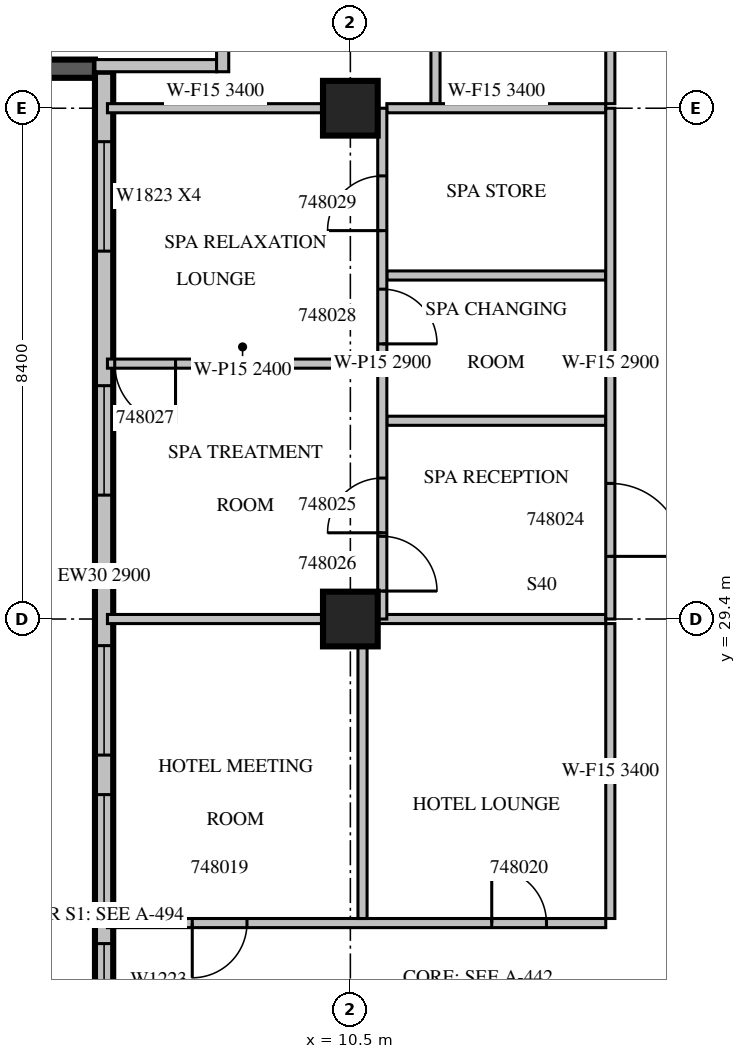
"""IFC4 building model, lengths in metres.
Left out: names, types, materials, properties, quantities, classifications, styles, units other than length and angle.
Written with IfcOpenShell. Run it as: python <this file> out.ifc"""

import sys

from ifc_helpers import new_model, si_unit, direction, frame, frame_2d, origin, origin_2d, place, context, subcontext, project, spatial, rectangle, extrude, source, transform, mapped, element, fill, save


model = new_model("IFC4")
c1 = context("Model", 3, precision=1e-05, world=origin(), true_north=direction((0.0, 1.0)))
c2 = subcontext(c1, "Body", "Model", "MODEL_VIEW")
j1 = project(units=[si_unit("LENGTHUNIT", "METRE"), si_unit("PLANEANGLEUNIT", "RADIAN")], contexts=[c1])
p1 = place(None, origin())
s1 = spatial("IfcSite", under=j1, at=p1, CompositionType="ELEMENT")
p2 = place(p1, origin())
s2 = spatial("IfcBuilding", under=s1, at=p2, CompositionType="ELEMENT")
p3 = place(p2, frame((0.0, 0.0, 215.8)))
s3 = spatial("IfcBuildingStorey", under=s2, at=p3, CompositionType="ELEMENT", Elevation=215.8)
m1 = source(origin(), c2, "Body", "SweptSolid", [
    extrude(rectangle(XDim=0.9, YDim=0.9, at=origin_2d()), origin(), (0.0, 0.0, 1.0), 3.8),
])
for number, where, z_axis, x_axis in (
    (1, (10.5, 29.4, 0.0), (0.0, 0.0, 1.0), (1.0, 0.0, 0.0)),
    (2, (10.5, 37.8, 0.0), (0.0, 0.0, 1.0), (1.0, 0.0, 0.0)),
):
    element("IfcColumn", number, at=place(p3, frame(where, z_axis=z_axis, x_axis=x_axis)), inside=s3, PredefinedType="COLUMN", context=c2, shape_type="MappedRepresentation", body=[
        mapped(m1, transform((0.0, 0.0, 0.0), scale=1.0)),
    ])
m2 = source(origin(), c2, "Body", "SweptSolid", [
    extrude(rectangle(XDim=6.1, YDim=0.3, at=frame_2d((3.05, 0.0))), origin(), (0.0, 0.0, 1.0), 3.4),
])
p4 = place(p3, frame((0.2, 38.45, 0.0), z_axis=(0.0, 0.0, 1.0), x_axis=(1.0, 0.0, 0.0)))
e3 = element("IfcWall", 3, at=p4, inside=s3, PredefinedType="SOLIDWALL", context=c2, shape_type="MappedRepresentation", body=[
    mapped(m2, transform((0.0, 0.0, 0.0), scale=1.0)),
])
m3 = source(origin(), c2, "Body", "SweptSolid", [
    extrude(rectangle(XDim=16.6, YDim=0.3, at=frame_2d((8.3, 0.0))), origin(), (0.0, 0.0, 1.0), 2.9),
])
p5 = place(p3, frame((6.45, 38.4, 0.0), z_axis=(0.0, 0.0, 1.0), x_axis=(0.0, -1.0, 0.0)))
e4 = element("IfcWall", 4, at=p5, inside=s3, PredefinedType="STANDARD", context=c2, shape_type="MappedRepresentation", body=[
    mapped(m3, transform((0.0, 0.0, 0.0), scale=1.0)),
])
m4 = source(origin(), c2, "Body", "SweptSolid", [
    extrude(rectangle(XDim=1.8, YDim=2.3, at=frame_2d((0.9, 1.15))), frame((0.0, 0.16, 0.0), z_axis=(0.0, -1.0, 0.0), x_axis=(1.0, 0.0, 0.0)), (0.0, 0.0, 1.0), 0.32),
])
p6 = place(p5, frame((1.15, 0.0, 0.6)))
e5 = element("IfcOpeningElement", 5, at=p6, cuts=e4, PredefinedType="OPENING", context=c2, shape_type="MappedRepresentation", body=[
    mapped(m4, transform((0.0, 0.0, 0.0), scale=1.0)),
])
p7 = place(p5, frame((5.162, 0.0, 0.6)))
e6 = element("IfcOpeningElement", 6, at=p7, cuts=e4, PredefinedType="OPENING", context=c2, shape_type="MappedRepresentation", body=[
    mapped(m4, transform((0.0, 0.0, 0.0), scale=1.0)),
])
p8 = place(p5, frame((9.438, 0.0, 0.6)))
e7 = element("IfcOpeningElement", 7, at=p8, cuts=e4, PredefinedType="OPENING", context=c2, shape_type="MappedRepresentation", body=[
    mapped(m4, transform((0.0, 0.0, 0.0), scale=1.0)),
])
m5 = source(origin(), c2, "Body", "SweptSolid", [
    extrude(rectangle(XDim=1.2, YDim=2.3, at=frame_2d((0.6, 1.15))), frame((0.0, 0.16, 0.0), z_axis=(0.0, -1.0, 0.0), x_axis=(1.0, 0.0, 0.0)), (0.0, 0.0, 1.0), 0.32),
])
p9 = place(p5, frame((14.338, 0.0, 0.6)))
e8 = element("IfcOpeningElement", 8, at=p9, cuts=e4, PredefinedType="OPENING", context=c2, shape_type="MappedRepresentation", body=[
    mapped(m5, transform((0.0, 0.0, 0.0), scale=1.0)),
])
p10 = place(p5, frame((11.887, 0.0, 0.6)))
e9 = element("IfcOpeningElement", 9, at=p10, cuts=e4, PredefinedType="OPENING", context=c2, shape_type="MappedRepresentation", body=[
    mapped(m4, transform((0.0, 0.0, 0.0), scale=1.0)),
])
m6 = source(origin(), c2, "Body", "SweptSolid", [
    extrude(rectangle(XDim=2.0, YDim=0.2, at=frame_2d((1.0, 0.0))), origin(), (0.0, 0.0, 1.0), 3.4),
])
p11 = place(p3, frame((6.3, 38.5, 0.0), z_axis=(0.0, 0.0, 1.0), x_axis=(1.0, 0.0, 0.0)))
e10 = element("IfcWall", 10, at=p11, inside=s3, PredefinedType="PARTITIONING", context=c2, shape_type="MappedRepresentation", body=[
    mapped(m6, transform((0.0, 0.0, 0.0), scale=1.0)),
])
m7 = source(origin(), c2, "Body", "SweptSolid", [
    extrude(rectangle(XDim=5.45, YDim=0.2, at=frame_2d((2.725, 0.0))), origin(), (0.0, 0.0, 1.0), 3.4),
])
p12 = place(p3, frame((8.4, 38.4, 0.0), z_axis=(0.0, 0.0, 1.0), x_axis=(0.0, 1.0, 0.0)))
e11 = element("IfcWall", 11, at=p12, inside=s3, PredefinedType="PARTITIONING", context=c2, shape_type="MappedRepresentation", body=[
    mapped(m7, transform((0.0, 0.0, 0.0), scale=1.0)),
])
m8 = source(origin(), c2, "Body", "SweptSolid", [
    extrude(rectangle(XDim=1.2, YDim=2.1, at=frame_2d((0.6, 1.05))), frame((0.0, 0.11, 0.0), z_axis=(0.0, -1.0, 0.0), x_axis=(1.0, 0.0, 0.0)), (0.0, 0.0, 1.0), 0.22),
])
p13 = place(p12, frame((0.4, 0.0, 0.0)))
e12 = element("IfcOpeningElement", 12, at=p13, cuts=e11, PredefinedType="OPENING", context=c2, shape_type="MappedRepresentation", body=[
    mapped(m8, transform((0.0, 0.0, 0.0), scale=1.0)),
])
m9 = source(origin(), c2, "Body", "SweptSolid", [
    extrude(rectangle(XDim=0.9, YDim=2.1, at=frame_2d((0.45, 1.05))), frame((0.0, 0.11, 0.0), z_axis=(0.0, -1.0, 0.0), x_axis=(1.0, 0.0, 0.0)), (0.0, 0.0, 1.0), 0.22),
])
p14 = place(p12, frame((3.25, 0.0, 0.0)))
e13 = element("IfcOpeningElement", 13, at=p14, cuts=e11, PredefinedType="OPENING", context=c2, shape_type="MappedRepresentation", body=[
    mapped(m9, transform((0.0, 0.0, 0.0), scale=1.0)),
])
m10 = source(origin(), c2, "Body", "SweptSolid", [
    extrude(rectangle(XDim=8.195, YDim=0.15, at=frame_2d((4.098, 0.0))), origin(), (0.0, 0.0, 1.0), 3.4),
])
p15 = place(p3, frame((6.505, 24.4, 0.0), z_axis=(0.0, 0.0, 1.0), x_axis=(1.0, 0.0, 0.0)))
e14 = element("IfcWall", 14, at=p15, inside=s3, PredefinedType="PARTITIONING", context=c2, shape_type="MappedRepresentation", body=[
    mapped(m10, transform((0.0, 0.0, 0.0), scale=1.0)),
])
m11 = source(origin(), c2, "Body", "SweptSolid", [
    extrude(rectangle(XDim=0.9, YDim=2.1, at=frame_2d((0.45, 1.05))), frame((0.0, 0.085, 0.0), z_axis=(0.0, -1.0, 0.0), x_axis=(1.0, 0.0, 0.0)), (0.0, 0.0, 1.0), 0.17),
])
p16 = place(p15, frame((1.395, 0.0, 0.0)))
e15 = element("IfcOpeningElement", 15, at=p16, cuts=e14, PredefinedType="OPENING", context=c2, shape_type="MappedRepresentation", body=[
    mapped(m11, transform((0.0, 0.0, 0.0), scale=1.0)),
])
p17 = place(p15, frame((6.32, 0.0, 0.0)))
e16 = element("IfcOpeningElement", 16, at=p17, cuts=e14, PredefinedType="OPENING", context=c2, shape_type="MappedRepresentation", body=[
    mapped(m11, transform((0.0, 0.0, 0.0), scale=1.0)),
])
p18 = place(p3, frame((10.7, 24.475, 0.0), z_axis=(0.0, 0.0, 1.0), x_axis=(0.0, 1.0, 0.0)))
e17 = element("IfcWall", 17, at=p18, inside=s3, PredefinedType="PARTITIONING", context=c2, shape_type="SweptSolid", body=[
    extrude(rectangle(XDim=4.476, YDim=0.15, at=frame_2d((2.238, 0.0))), origin(), (0.0, 0.0, 1.0), 3.4),
])
m12 = source(origin(), c2, "Body", "SweptSolid", [
    extrude(rectangle(XDim=4.85, YDim=0.15, at=frame_2d((2.425, 0.0))), origin(), (0.0, 0.0, 1.0), 3.4),
])
p19 = place(p3, frame((14.775, 24.475, 0.0), z_axis=(0.0, 0.0, 1.0), x_axis=(0.0, 1.0, 0.0)))
e18 = element("IfcWall", 18, at=p19, inside=s3, PredefinedType="PARTITIONING", context=c2, shape_type="MappedRepresentation", body=[
    mapped(m12, transform((0.0, 0.0, 0.0), scale=1.0)),
])
m13 = source(origin(), c2, "Body", "SweptSolid", [
    extrude(rectangle(XDim=3.546, YDim=0.15, at=frame_2d((1.773, 0.0))), origin(), (0.0, 0.0, 1.0), 3.4),
])
p20 = place(p3, frame((10.051, 29.4, 0.0), z_axis=(0.0, 0.0, 1.0), x_axis=(-1.0, 0.0, 0.0)))
e19 = element("IfcWall", 19, at=p20, inside=s3, PredefinedType="PARTITIONING", context=c2, shape_type="MappedRepresentation", body=[
    mapped(m13, transform((0.0, 0.0, 0.0), scale=1.0)),
])
m14 = source(origin(), c2, "Body", "SweptSolid", [
    extrude(rectangle(XDim=3.751, YDim=0.15, at=frame_2d((1.875, 0.0))), origin(), (0.0, 0.0, 1.0), 3.4),
])
p21 = place(p3, frame((14.7, 29.4, 0.0), z_axis=(0.0, 0.0, 1.0), x_axis=(-1.0, 0.0, 0.0)))
e20 = element("IfcWall", 20, at=p21, inside=s3, PredefinedType="PARTITIONING", context=c2, shape_type="MappedRepresentation", body=[
    mapped(m14, transform((0.0, 0.0, 0.0), scale=1.0)),
])
m15 = source(origin(), c2, "Body", "SweptSolid", [
    extrude(rectangle(XDim=6.45, YDim=0.15, at=frame_2d((3.225, 0.0))), origin(), (0.0, 0.0, 1.0), 3.4),
])
p22 = place(p3, frame((11.9, 44.325, 0.0), z_axis=(0.0, 0.0, 1.0), x_axis=(0.0, -1.0, 0.0)))
e21 = element("IfcWall", 21, at=p22, inside=s3, PredefinedType="PARTITIONING", context=c2, shape_type="MappedRepresentation", body=[
    mapped(m15, transform((0.0, 0.0, 0.0), scale=1.0)),
])
p23 = place(p3, frame((14.775, 37.875, 0.0), z_axis=(0.0, 0.0, 1.0), x_axis=(0.0, 1.0, 0.0)))
e22 = element("IfcWall", 22, at=p23, inside=s3, PredefinedType="PARTITIONING", context=c2, shape_type="MappedRepresentation", body=[
    mapped(m15, transform((0.0, 0.0, 0.0), scale=1.0)),
])
p24 = place(p23, frame((2.737, 0.0, 0.0)))
e23 = element("IfcOpeningElement", 23, at=p24, cuts=e22, PredefinedType="OPENING", context=c2, shape_type="MappedRepresentation", body=[
    mapped(m11, transform((0.0, 0.0, 0.0), scale=1.0)),
])
m16 = source(origin(), c2, "Body", "SweptSolid", [
    extrude(rectangle(XDim=4.445, YDim=0.15, at=frame_2d((2.223, 0.0))), origin(), (0.0, 0.0, 1.0), 2.4),
])
p25 = place(p3, frame((10.95, 33.6, 0.0), z_axis=(0.0, 0.0, 1.0), x_axis=(-1.0, 0.0, 0.0)))
e24 = element("IfcWall", 24, at=p25, inside=s3, PredefinedType="PARTITIONING", context=c2, shape_type="MappedRepresentation", body=[
    mapped(m16, transform((0.0, 0.0, 0.0), scale=1.0)),
])
m17 = source(origin(), c2, "Body", "SweptSolid", [
    extrude(rectangle(XDim=1.0, YDim=2.1, at=frame_2d((0.5, 1.05))), frame((0.0, 0.085, 0.0), z_axis=(0.0, -1.0, 0.0), x_axis=(1.0, 0.0, 0.0)), (0.0, 0.0, 1.0), 0.17),
])
p26 = place(p25, frame((3.325, 0.0, 0.0)))
e25 = element("IfcOpeningElement", 25, at=p26, cuts=e24, PredefinedType="OPENING", context=c2, shape_type="MappedRepresentation", body=[
    mapped(m17, transform((0.0, 0.0, 0.0), scale=1.0)),
])
m18 = source(origin(), c2, "Body", "SweptSolid", [
    extrude(rectangle(XDim=3.6, YDim=0.15, at=frame_2d((1.8, 0.0))), origin(), (0.0, 0.0, 1.0), 3.4),
])
for number, where, z_axis, x_axis in (
    (26, (14.7, 32.66, 0.0), (0.0, 0.0, 1.0), (-1.0, 0.0, 0.0)),
    (27, (14.7, 35.049, 0.0), (0.0, 0.0, 1.0), (-1.0, 0.0, 0.0)),
):
    element("IfcWall", number, at=place(p3, frame(where, z_axis=z_axis, x_axis=x_axis)), inside=s3, PredefinedType="PARTITIONING", context=c2, shape_type="MappedRepresentation", body=[
        mapped(m18, transform((0.0, 0.0, 0.0), scale=1.0)),
    ])
p27 = place(p3, frame((10.051, 37.8, 0.0), z_axis=(0.0, 0.0, 1.0), x_axis=(-1.0, 0.0, 0.0)))
e28 = element("IfcWall", 28, at=p27, inside=s3, PredefinedType="PARTITIONING", context=c2, shape_type="MappedRepresentation", body=[
    mapped(m13, transform((0.0, 0.0, 0.0), scale=1.0)),
])
p28 = place(p3, frame((14.7, 37.8, 0.0), z_axis=(0.0, 0.0, 1.0), x_axis=(-1.0, 0.0, 0.0)))
e29 = element("IfcWall", 29, at=p28, inside=s3, PredefinedType="PARTITIONING", context=c2, shape_type="MappedRepresentation", body=[
    mapped(m18, transform((0.0, 0.0, 0.0), scale=1.0)),
])
m19 = source(origin(), c2, "Body", "SweptSolid", [
    extrude(rectangle(XDim=8.4, YDim=0.15, at=frame_2d((4.2, 0.0))), origin(), (0.0, 0.0, 1.0), 2.9),
])
p29 = place(p3, frame((11.025, 29.4, 0.0), z_axis=(0.0, 0.0, 1.0), x_axis=(0.0, 1.0, 0.0)))
e30 = element("IfcWall", 30, at=p29, inside=s3, PredefinedType="PARTITIONING", context=c2, shape_type="MappedRepresentation", body=[
    mapped(m19, transform((0.0, 0.0, 0.0), scale=1.0)),
])
p30 = place(p29, frame((1.418, 0.0, 0.0)))
e31 = element("IfcOpeningElement", 31, at=p30, cuts=e30, PredefinedType="OPENING", context=c2, shape_type="MappedRepresentation", body=[
    mapped(m11, transform((0.0, 0.0, 0.0), scale=1.0)),
])
p31 = place(p29, frame((0.46, 0.0, 0.0)))
e32 = element("IfcOpeningElement", 32, at=p31, cuts=e30, PredefinedType="OPENING", context=c2, shape_type="MappedRepresentation", body=[
    mapped(m11, transform((0.0, 0.0, 0.0), scale=1.0)),
])
p32 = place(p29, frame((4.525, 0.0, 0.0)))
e33 = element("IfcOpeningElement", 33, at=p32, cuts=e30, PredefinedType="OPENING", context=c2, shape_type="MappedRepresentation", body=[
    mapped(m11, transform((0.0, 0.0, 0.0), scale=1.0)),
])
p33 = place(p29, frame((6.387, 0.0, 0.0)))
e34 = element("IfcOpeningElement", 34, at=p33, cuts=e30, PredefinedType="OPENING", context=c2, shape_type="MappedRepresentation", body=[
    mapped(m11, transform((0.0, 0.0, 0.0), scale=1.0)),
])
p34 = place(p3, frame((14.775, 29.4, 0.0), z_axis=(0.0, 0.0, 1.0), x_axis=(0.0, 1.0, 0.0)))
e35 = element("IfcWall", 35, at=p34, inside=s3, PredefinedType="PARTITIONING", context=c2, shape_type="MappedRepresentation", body=[
    mapped(m19, transform((0.0, 0.0, 0.0), scale=1.0)),
])
m20 = source(origin(), c2, "Body", "SweptSolid", [
    extrude(rectangle(XDim=1.2, YDim=2.1, at=frame_2d((0.6, 1.05))), frame((0.0, 0.085, 0.0), z_axis=(0.0, -1.0, 0.0), x_axis=(1.0, 0.0, 0.0)), (0.0, 0.0, 1.0), 0.17),
])
p35 = place(p34, frame((1.03, 0.0, 0.0)))
e36 = element("IfcOpeningElement", 36, at=p35, cuts=e35, PredefinedType="OPENING", context=c2, shape_type="MappedRepresentation", body=[
    mapped(m20, transform((0.0, 0.0, 0.0), scale=1.0)),
])
m21 = source(origin(), c2, "Body", "SweptSolid", [
    extrude(rectangle(XDim=1.8, YDim=2.3, at=frame_2d((0.9, 1.15))), frame((0.0, 0.03, 0.0), z_axis=(0.0, -1.0, 0.0), x_axis=(1.0, 0.0, 0.0)), (0.0, 0.0, 1.0), 0.06),
])
p36 = place(p6, origin())
e37 = element("IfcWindow", 37, at=p36, inside=s3, PartitioningType="SINGLE_PANEL", PredefinedType="WINDOW", context=c2, shape_type="MappedRepresentation", body=[
    mapped(m21, transform((0.0, 0.0, 0.0), scale=1.0)),
])
fill(e5, e37)
p37 = place(p7, origin())
e38 = element("IfcWindow", 38, at=p37, inside=s3, PartitioningType="SINGLE_PANEL", PredefinedType="WINDOW", context=c2, shape_type="MappedRepresentation", body=[
    mapped(m21, transform((0.0, 0.0, 0.0), scale=1.0)),
])
fill(e6, e38)
p38 = place(p8, origin())
e39 = element("IfcWindow", 39, at=p38, inside=s3, PartitioningType="SINGLE_PANEL", PredefinedType="WINDOW", context=c2, shape_type="MappedRepresentation", body=[
    mapped(m21, transform((0.0, 0.0, 0.0), scale=1.0)),
])
fill(e7, e39)
m22 = source(origin(), c2, "Body", "SweptSolid", [
    extrude(rectangle(XDim=1.2, YDim=2.3, at=frame_2d((0.6, 1.15))), frame((0.0, 0.03, 0.0), z_axis=(0.0, -1.0, 0.0), x_axis=(1.0, 0.0, 0.0)), (0.0, 0.0, 1.0), 0.06),
])
p39 = place(p9, origin())
e40 = element("IfcWindow", 40, at=p39, inside=s3, PartitioningType="SINGLE_PANEL", PredefinedType="WINDOW", context=c2, shape_type="MappedRepresentation", body=[
    mapped(m22, transform((0.0, 0.0, 0.0), scale=1.0)),
])
fill(e8, e40)
p40 = place(p10, origin())
e41 = element("IfcWindow", 41, at=p40, inside=s3, PartitioningType="SINGLE_PANEL", PredefinedType="WINDOW", context=c2, shape_type="MappedRepresentation", body=[
    mapped(m21, transform((0.0, 0.0, 0.0), scale=1.0)),
])
fill(e9, e41)
m23 = source(origin(), c2, "Body", "SweptSolid", [
    extrude(rectangle(XDim=0.9, YDim=2.1, at=frame_2d((0.45, 1.05))), frame((0.0, 0.025, 0.0), z_axis=(0.0, -1.0, 0.0), x_axis=(1.0, 0.0, 0.0)), (0.0, 0.0, 1.0), 0.05),
])
p41 = place(p16, origin())
e42 = element("IfcDoor", 42, at=p41, inside=s3, OperationType="SINGLE_SWING_RIGHT", PredefinedType="DOOR", context=c2, shape_type="MappedRepresentation", body=[
    mapped(m23, transform((0.0, 0.0, 0.0), scale=1.0)),
])
fill(e15, e42)
p42 = place(p17, origin())
e43 = element("IfcDoor", 43, at=p42, inside=s3, OperationType="SINGLE_SWING_LEFT", PredefinedType="DOOR", context=c2, shape_type="MappedRepresentation", body=[
    mapped(m23, transform((0.0, 0.0, 0.0), scale=1.0)),
])
fill(e16, e43)
m24 = source(origin(), c2, "Body", "SweptSolid", [
    extrude(rectangle(XDim=1.2, YDim=2.1, at=frame_2d((0.6, 1.05))), frame((0.0, 0.025, 0.0), z_axis=(0.0, -1.0, 0.0), x_axis=(1.0, 0.0, 0.0)), (0.0, 0.0, 1.0), 0.05),
])
p43 = place(p35, origin())
e44 = element("IfcDoor", 44, at=p43, inside=s3, OperationType="SINGLE_SWING_RIGHT", PredefinedType="DOOR", context=c2, shape_type="MappedRepresentation", body=[
    mapped(m24, transform((0.0, 0.0, 0.0), scale=1.0)),
])
fill(e36, e44)
p44 = place(p30, origin())
e45 = element("IfcDoor", 45, at=p44, inside=s3, OperationType="SINGLE_SWING_LEFT", PredefinedType="DOOR", context=c2, shape_type="MappedRepresentation", body=[
    mapped(m23, transform((0.0, 0.0, 0.0), scale=1.0)),
])
fill(e31, e45)
p45 = place(p31, origin())
e46 = element("IfcDoor", 46, at=p45, inside=s3, OperationType="SINGLE_SWING_RIGHT", PredefinedType="DOOR", context=c2, shape_type="MappedRepresentation", body=[
    mapped(m23, transform((0.0, 0.0, 0.0), scale=1.0)),
])
fill(e32, e46)
m25 = source(origin(), c2, "Body", "SweptSolid", [
    extrude(rectangle(XDim=1.0, YDim=2.1, at=frame_2d((0.5, 1.05))), frame((0.0, 0.025, 0.0), z_axis=(0.0, -1.0, 0.0), x_axis=(1.0, 0.0, 0.0)), (0.0, 0.0, 1.0), 0.05),
])
p46 = place(p26, origin())
e47 = element("IfcDoor", 47, at=p46, inside=s3, OperationType="SINGLE_SWING_LEFT", PredefinedType="DOOR", context=c2, shape_type="MappedRepresentation", body=[
    mapped(m25, transform((0.0, 0.0, 0.0), scale=1.0)),
])
fill(e25, e47)
p47 = place(p32, origin())
e48 = element("IfcDoor", 48, at=p47, inside=s3, OperationType="SINGLE_SWING_RIGHT", PredefinedType="DOOR", context=c2, shape_type="MappedRepresentation", body=[
    mapped(m23, transform((0.0, 0.0, 0.0), scale=1.0)),
])
fill(e33, e48)
p48 = place(p33, origin())
e49 = element("IfcDoor", 49, at=p48, inside=s3, OperationType="SINGLE_SWING_LEFT", PredefinedType="DOOR", context=c2, shape_type="MappedRepresentation", body=[
    mapped(m23, transform((0.0, 0.0, 0.0), scale=1.0)),
])
fill(e34, e49)
save(model, sys.argv[1])
